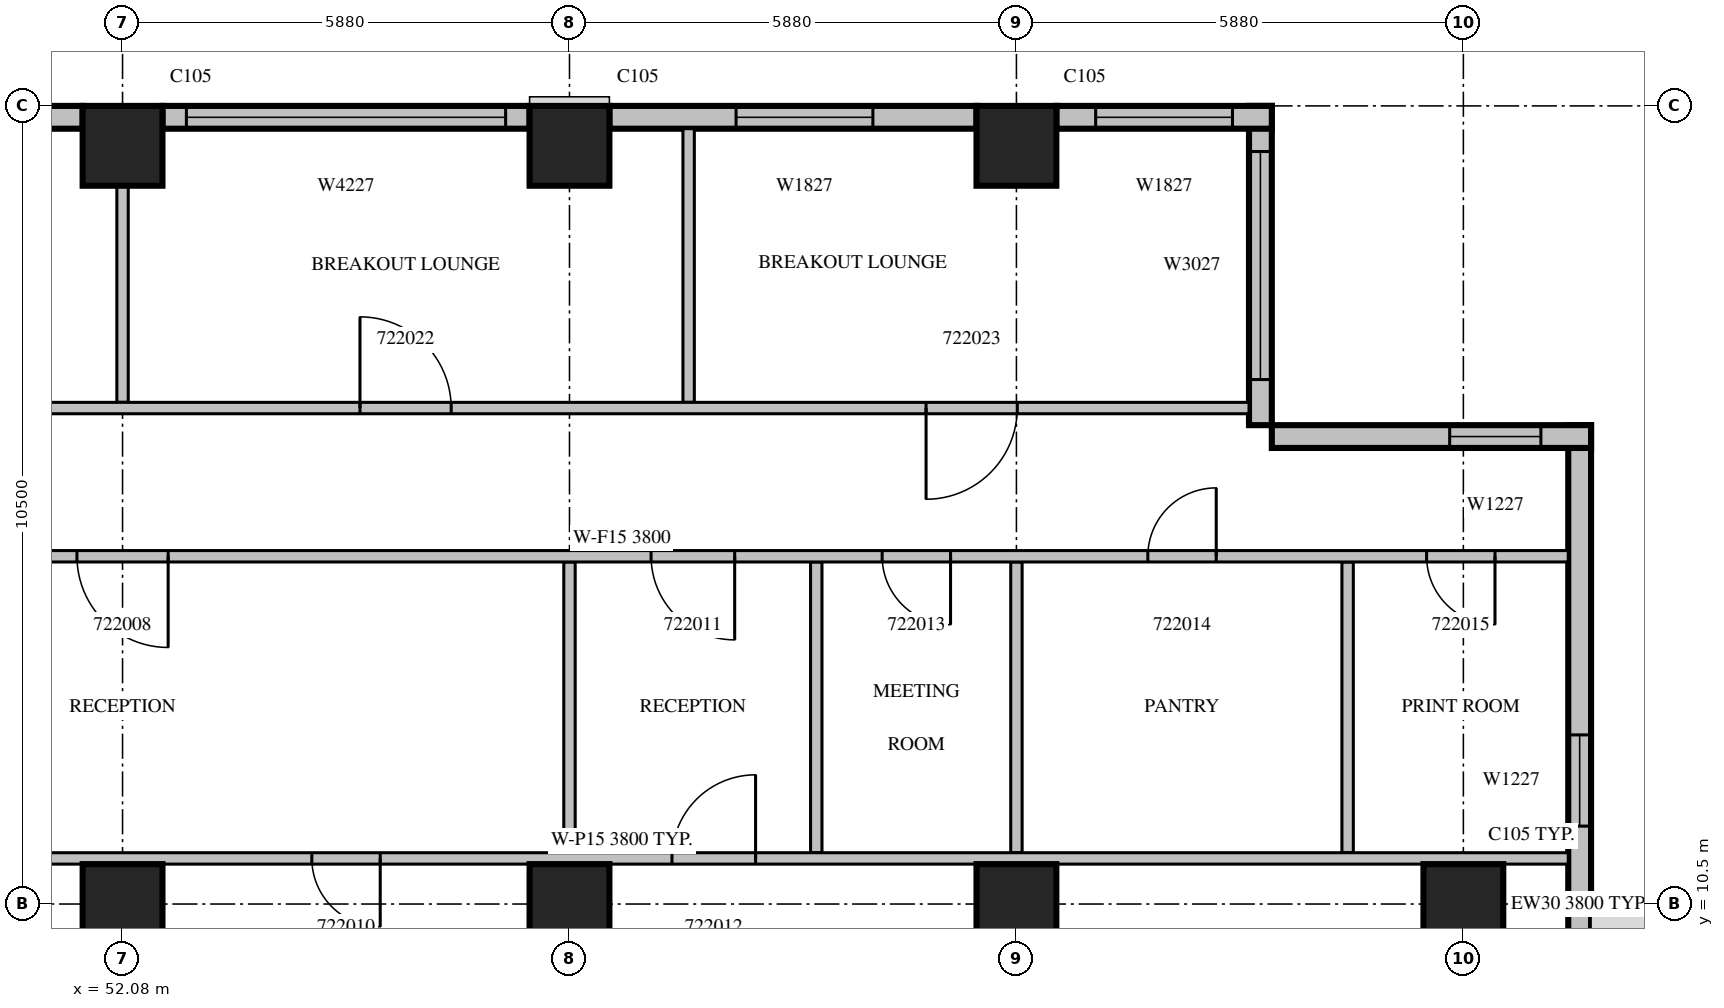
"""IFC4 building model, lengths in metres.
Left out: names, types, materials, properties, quantities, classifications, styles, units other than length and angle.
Written with IfcOpenShell. Run it as: python <this file> out.ifc"""

import sys

from ifc_helpers import new_model, si_unit, direction, frame, frame_2d, origin, origin_2d, place, context, subcontext, project, spatial, rectangle, extrude, source, transform, mapped, element, fill, save


model = new_model("IFC4")
c1 = context("Model", 3, precision=1e-05, world=origin(), true_north=direction((0.0, 1.0)))
c2 = subcontext(c1, "Body", "Model", "MODEL_VIEW")
j1 = project(units=[si_unit("LENGTHUNIT", "METRE"), si_unit("PLANEANGLEUNIT", "RADIAN")], contexts=[c1])
p1 = place(None, origin())
s1 = spatial("IfcSite", under=j1, at=p1, CompositionType="ELEMENT")
p2 = place(p1, origin())
s2 = spatial("IfcBuilding", under=s1, at=p2, CompositionType="ELEMENT")
p3 = place(p2, frame((0.0, 0.0, 103.5)))
s3 = spatial("IfcBuildingStorey", under=s2, at=p3, CompositionType="ELEMENT", Elevation=103.5)
m1 = source(origin(), c2, "Body", "SweptSolid", [
    extrude(rectangle(XDim=1.05, YDim=1.05, at=origin_2d()), origin(), (0.0, 0.0, 1.0), 4.2),
])
for number, where, z_axis, x_axis in (
    (1, (52.08, 10.5, 0.0), (0.0, 0.0, 1.0), (1.0, 0.0, 0.0)),
    (2, (57.96, 10.5, 0.0), (0.0, 0.0, 1.0), (1.0, 0.0, 0.0)),
    (3, (63.84, 10.5, 0.0), (0.0, 0.0, 1.0), (1.0, 0.0, 0.0)),
    (4, (69.72, 10.5, 0.0), (0.0, 0.0, 1.0), (1.0, 0.0, 0.0)),
    (5, (52.08, 20.475, 0.0), (0.0, 0.0, 1.0), (1.0, 0.0, 0.0)),
    (6, (57.96, 20.475, 0.0), (0.0, 0.0, 1.0), (1.0, 0.0, 0.0)),
    (7, (63.84, 20.475, 0.0), (0.0, 0.0, 1.0), (1.0, 0.0, 0.0)),
):
    element("IfcColumn", number, at=place(p3, frame(where, z_axis=z_axis, x_axis=x_axis)), inside=s3, PredefinedType="COLUMN", context=c2, shape_type="MappedRepresentation", body=[
        mapped(m1, transform((0.0, 0.0, 0.0), scale=1.0)),
    ])
m2 = source(origin(), c2, "Body", "SweptSolid", [
    extrude(rectangle(XDim=3.15, YDim=0.3, at=frame_2d((1.575, 0.0))), origin(), (0.0, 0.0, 1.0), 3.8),
])
p4 = place(p3, frame((71.25, 7.35, 0.0), z_axis=(0.0, 0.0, 1.0), x_axis=(0.0, 1.0, 0.0)))
e8 = element("IfcWall", 8, at=p4, inside=s3, PredefinedType="STANDARD", context=c2, shape_type="MappedRepresentation", body=[
    mapped(m2, transform((0.0, 0.0, 0.0), scale=1.0)),
])
m3 = source(origin(), c2, "Body", "SweptSolid", [
    extrude(rectangle(XDim=1.8, YDim=2.4, at=frame_2d((0.9, 1.2))), frame((0.0, 0.16, 0.0), z_axis=(0.0, -1.0, 0.0), x_axis=(1.0, 0.0, 0.0)), (0.0, 0.0, 1.0), 0.32),
])
p5 = place(p4, frame((0.675, 0.0, 0.0)))
e9 = element("IfcOpeningElement", 9, at=p5, cuts=e8, PredefinedType="OPENING", context=c2, shape_type="MappedRepresentation", body=[
    mapped(m3, transform((0.0, 0.0, 0.0), scale=1.0)),
])
m4 = source(origin(), c2, "Body", "SweptSolid", [
    extrude(rectangle(XDim=6.3, YDim=0.3, at=frame_2d((3.15, 0.0))), origin(), (0.0, 0.0, 1.0), 3.8),
])
p6 = place(p3, frame((71.25, 10.5, 0.0), z_axis=(0.0, 0.0, 1.0), x_axis=(0.0, 1.0, 0.0)))
e10 = element("IfcWall", 10, at=p6, inside=s3, PredefinedType="STANDARD", context=c2, shape_type="MappedRepresentation", body=[
    mapped(m4, transform((0.0, 0.0, 0.0), scale=1.0)),
])
m5 = source(origin(), c2, "Body", "SweptSolid", [
    extrude(rectangle(XDim=1.2, YDim=2.7, at=frame_2d((0.6, 1.35))), frame((0.0, 0.16, 0.0), z_axis=(0.0, -1.0, 0.0), x_axis=(1.0, 0.0, 0.0)), (0.0, 0.0, 1.0), 0.32),
])
p7 = place(p6, frame((1.025, 0.0, 0.6)))
e11 = element("IfcOpeningElement", 11, at=p7, cuts=e10, PredefinedType="OPENING", context=c2, shape_type="MappedRepresentation", body=[
    mapped(m5, transform((0.0, 0.0, 0.0), scale=1.0)),
])
m6 = source(origin(), c2, "Body", "SweptSolid", [
    extrude(rectangle(XDim=4.2, YDim=0.3, at=frame_2d((2.1, 0.0))), origin(), (0.0, 0.0, 1.0), 3.8),
])
p8 = place(p3, frame((71.4, 16.65, 0.0), z_axis=(0.0, 0.0, 1.0), x_axis=(-1.0, 0.0, 0.0)))
e12 = element("IfcWall", 12, at=p8, inside=s3, PredefinedType="STANDARD", context=c2, shape_type="MappedRepresentation", body=[
    mapped(m6, transform((0.0, 0.0, 0.0), scale=1.0)),
])
p9 = place(p8, frame((0.66, 0.0, 0.6)))
e13 = element("IfcOpeningElement", 13, at=p9, cuts=e12, PredefinedType="OPENING", context=c2, shape_type="MappedRepresentation", body=[
    mapped(m5, transform((0.0, 0.0, 0.0), scale=1.0)),
])
p10 = place(p3, frame((67.05, 16.8, 0.0), z_axis=(0.0, 0.0, 1.0), x_axis=(0.0, 1.0, 0.0)))
e14 = element("IfcWall", 14, at=p10, inside=s3, PredefinedType="STANDARD", context=c2, shape_type="MappedRepresentation", body=[
    mapped(m6, transform((0.0, 0.0, 0.0), scale=1.0)),
])
m7 = source(origin(), c2, "Body", "SweptSolid", [
    extrude(rectangle(XDim=3.0, YDim=2.7, at=frame_2d((1.5, 1.35))), frame((0.0, 0.16, 0.0), z_axis=(0.0, -1.0, 0.0), x_axis=(1.0, 0.0, 0.0)), (0.0, 0.0, 1.0), 0.32),
])
p11 = place(p10, frame((0.6, 0.0, 0.6)))
e15 = element("IfcOpeningElement", 15, at=p11, cuts=e14, PredefinedType="OPENING", context=c2, shape_type="MappedRepresentation", body=[
    mapped(m7, transform((0.0, 0.0, 0.0), scale=1.0)),
])
m8 = source(origin(), c2, "Body", "SweptSolid", [
    extrude(rectangle(XDim=2.835, YDim=0.3, at=frame_2d((1.417, 0.0))), origin(), (0.0, 0.0, 1.0), 3.8),
])
p12 = place(p3, frame((67.2, 20.85, 0.0), z_axis=(0.0, 0.0, 1.0), x_axis=(-1.0, 0.0, 0.0)))
e16 = element("IfcWall", 16, at=p12, inside=s3, PredefinedType="STANDARD", context=c2, shape_type="MappedRepresentation", body=[
    mapped(m8, transform((0.0, 0.0, 0.0), scale=1.0)),
])
m9 = source(origin(), c2, "Body", "SweptSolid", [
    extrude(rectangle(XDim=1.8, YDim=2.7, at=frame_2d((0.9, 1.35))), frame((0.0, 0.16, 0.0), z_axis=(0.0, -1.0, 0.0), x_axis=(1.0, 0.0, 0.0)), (0.0, 0.0, 1.0), 0.32),
])
p13 = place(p12, frame((0.517, 0.0, 0.6)))
e17 = element("IfcOpeningElement", 17, at=p13, cuts=e16, PredefinedType="OPENING", context=c2, shape_type="MappedRepresentation", body=[
    mapped(m9, transform((0.0, 0.0, 0.0), scale=1.0)),
])
m10 = source(origin(), c2, "Body", "SweptSolid", [
    extrude(rectangle(XDim=4.83, YDim=0.3, at=frame_2d((2.415, 0.0))), origin(), (0.0, 0.0, 1.0), 3.8),
])
p14 = place(p3, frame((63.315, 20.85, 0.0), z_axis=(0.0, 0.0, 1.0), x_axis=(-1.0, 0.0, 0.0)))
e18 = element("IfcWall", 18, at=p14, inside=s3, PredefinedType="STANDARD", context=c2, shape_type="MappedRepresentation", body=[
    mapped(m10, transform((0.0, 0.0, 0.0), scale=1.0)),
])
p15 = place(p14, frame((1.363, 0.0, 0.6)))
e19 = element("IfcOpeningElement", 19, at=p15, cuts=e18, PredefinedType="OPENING", context=c2, shape_type="MappedRepresentation", body=[
    mapped(m9, transform((0.0, 0.0, 0.0), scale=1.0)),
])
p16 = place(p3, frame((57.435, 20.85, 0.0), z_axis=(0.0, 0.0, 1.0), x_axis=(-1.0, 0.0, 0.0)))
e20 = element("IfcWall", 20, at=p16, inside=s3, PredefinedType="STANDARD", context=c2, shape_type="MappedRepresentation", body=[
    mapped(m10, transform((0.0, 0.0, 0.0), scale=1.0)),
])
p17 = place(p16, frame((0.315, 0.0, 0.6)))
e21 = element("IfcOpeningElement", 21, at=p17, cuts=e20, PredefinedType="OPENING", context=c2, shape_type="SweptSolid", body=[
    extrude(rectangle(XDim=4.2, YDim=2.7, at=frame_2d((2.1, 1.35))), frame((0.0, 0.16, 0.0), z_axis=(0.0, -1.0, 0.0), x_axis=(1.0, 0.0, 0.0)), (0.0, 0.0, 1.0), 0.32),
])
p18 = place(p3, frame((51.555, 20.85, 0.0), z_axis=(0.0, 0.0, 1.0), x_axis=(-1.0, 0.0, 0.0)))
e22 = element("IfcWall", 22, at=p18, inside=s3, PredefinedType="STANDARD", context=c2, shape_type="MappedRepresentation", body=[
    mapped(m10, transform((0.0, 0.0, 0.0), scale=1.0)),
])
p19 = place(p18, frame((2.47, 0.0, 0.6)))
e23 = element("IfcOpeningElement", 23, at=p19, cuts=e22, PredefinedType="OPENING", context=c2, shape_type="MappedRepresentation", body=[
    mapped(m5, transform((0.0, 0.0, 0.0), scale=1.0)),
])
p20 = place(p3, frame((61.207, 11.175, 0.0), z_axis=(0.0, 0.0, 1.0), x_axis=(0.0, 1.0, 0.0)))
e24 = element("IfcWall", 24, at=p20, inside=s3, PredefinedType="PARTITIONING", context=c2, shape_type="SweptSolid", body=[
    extrude(rectangle(XDim=3.825, YDim=0.15, at=frame_2d((1.913, 0.0))), origin(), (0.0, 0.0, 1.0), 3.8),
])
m11 = source(origin(), c2, "Body", "SweptSolid", [
    extrude(rectangle(XDim=3.825, YDim=0.15, at=frame_2d((1.913, 0.0))), origin(), (0.0, 0.0, 1.0), 3.8),
])
for number, where, z_axis, x_axis in (
    (25, (63.84, 11.175, 0.0), (0.0, 0.0, 1.0), (0.0, 1.0, 0.0)),
    (26, (68.197, 11.175, 0.0), (0.0, 0.0, 1.0), (0.0, 1.0, 0.0)),
    (27, (57.96, 11.175, 0.0), (0.0, 0.0, 1.0), (0.0, 1.0, 0.0)),
):
    element("IfcWall", number, at=place(p3, frame(where, z_axis=z_axis, x_axis=x_axis)), inside=s3, PredefinedType="PARTITIONING", context=c2, shape_type="MappedRepresentation", body=[
        mapped(m11, transform((0.0, 0.0, 0.0), scale=1.0)),
    ])
m12 = source(origin(), c2, "Body", "SweptSolid", [
    extrude(rectangle(XDim=24.9, YDim=0.15, at=frame_2d((12.45, 0.0))), origin(), (0.0, 0.0, 1.0), 3.8),
])
p21 = place(p3, frame((71.1, 11.1, 0.0), z_axis=(0.0, 0.0, 1.0), x_axis=(-1.0, 0.0, 0.0)))
e28 = element("IfcWall", 28, at=p21, inside=s3, PredefinedType="PARTITIONING", context=c2, shape_type="MappedRepresentation", body=[
    mapped(m12, transform((0.0, 0.0, 0.0), scale=1.0)),
])
m13 = source(origin(), c2, "Body", "SweptSolid", [
    extrude(rectangle(XDim=0.9, YDim=2.1, at=frame_2d((0.45, 1.05))), frame((0.0, 0.085, 0.0), z_axis=(0.0, -1.0, 0.0), x_axis=(1.0, 0.0, 0.0)), (0.0, 0.0, 1.0), 0.17),
])
p22 = place(p21, frame((21.51, 0.0, 0.0)))
e29 = element("IfcOpeningElement", 29, at=p22, cuts=e28, PredefinedType="OPENING", context=c2, shape_type="MappedRepresentation", body=[
    mapped(m13, transform((0.0, 0.0, 0.0), scale=1.0)),
])
p23 = place(p21, frame((15.63, 0.0, 0.0)))
e30 = element("IfcOpeningElement", 30, at=p23, cuts=e28, PredefinedType="OPENING", context=c2, shape_type="MappedRepresentation", body=[
    mapped(m13, transform((0.0, 0.0, 0.0), scale=1.0)),
])
m14 = source(origin(), c2, "Body", "SweptSolid", [
    extrude(rectangle(XDim=1.1, YDim=2.1, at=frame_2d((0.55, 1.05))), frame((0.0, 0.085, 0.0), z_axis=(0.0, -1.0, 0.0), x_axis=(1.0, 0.0, 0.0)), (0.0, 0.0, 1.0), 0.17),
])
p24 = place(p21, frame((10.692, 0.0, 0.0)))
e31 = element("IfcOpeningElement", 31, at=p24, cuts=e28, PredefinedType="OPENING", context=c2, shape_type="MappedRepresentation", body=[
    mapped(m14, transform((0.0, 0.0, 0.0), scale=1.0)),
])
m15 = source(origin(), c2, "Body", "SweptSolid", [
    extrude(rectangle(XDim=3.6, YDim=0.15, at=frame_2d((1.8, 0.0))), origin(), (0.0, 0.0, 1.0), 3.8),
])
p25 = place(p3, frame((59.528, 20.7, 0.0), z_axis=(0.0, 0.0, 1.0), x_axis=(0.0, -1.0, 0.0)))
e32 = element("IfcWall", 32, at=p25, inside=s3, PredefinedType="PARTITIONING", context=c2, shape_type="MappedRepresentation", body=[
    mapped(m15, transform((0.0, 0.0, 0.0), scale=1.0)),
])
m16 = source(origin(), c2, "Body", "SweptSolid", [
    extrude(rectangle(XDim=2.851, YDim=0.15, at=frame_2d((1.425, 0.0))), origin(), (0.0, 0.0, 1.0), 3.8),
])
p26 = place(p3, frame((52.08, 17.1, 0.0), z_axis=(0.0, 0.0, 1.0), x_axis=(0.0, 1.0, 0.0)))
e33 = element("IfcWall", 33, at=p26, inside=s3, PredefinedType="PARTITIONING", context=c2, shape_type="MappedRepresentation", body=[
    mapped(m16, transform((0.0, 0.0, 0.0), scale=1.0)),
])
p27 = place(p3, frame((71.1, 15.075, 0.0), z_axis=(0.0, 0.0, 1.0), x_axis=(-1.0, 0.0, 0.0)))
e34 = element("IfcWall", 34, at=p27, inside=s3, PredefinedType="PARTITIONING", context=c2, shape_type="MappedRepresentation", body=[
    mapped(m12, transform((0.0, 0.0, 0.0), scale=1.0)),
])
m17 = source(origin(), c2, "Body", "SweptSolid", [
    extrude(rectangle(XDim=1.2, YDim=2.1, at=frame_2d((0.6, 1.05))), frame((0.0, 0.085, 0.0), z_axis=(0.0, -1.0, 0.0), x_axis=(1.0, 0.0, 0.0)), (0.0, 0.0, 1.0), 0.17),
])
p28 = place(p27, frame((18.42, 0.0, 0.0)))
e35 = element("IfcOpeningElement", 35, at=p28, cuts=e34, PredefinedType="OPENING", context=c2, shape_type="MappedRepresentation", body=[
    mapped(m17, transform((0.0, 0.0, 0.0), scale=1.0)),
])
p29 = place(p27, frame((10.967, 0.0, 0.0)))
e36 = element("IfcOpeningElement", 36, at=p29, cuts=e34, PredefinedType="OPENING", context=c2, shape_type="MappedRepresentation", body=[
    mapped(m14, transform((0.0, 0.0, 0.0), scale=1.0)),
])
p30 = place(p27, frame((8.127, 0.0, 0.0)))
e37 = element("IfcOpeningElement", 37, at=p30, cuts=e34, PredefinedType="OPENING", context=c2, shape_type="MappedRepresentation", body=[
    mapped(m13, transform((0.0, 0.0, 0.0), scale=1.0)),
])
p31 = place(p27, frame((4.631, 0.0, 0.0)))
e38 = element("IfcOpeningElement", 38, at=p31, cuts=e34, PredefinedType="OPENING", context=c2, shape_type="MappedRepresentation", body=[
    mapped(m13, transform((0.0, 0.0, 0.0), scale=1.0)),
])
p32 = place(p27, frame((0.964, 0.0, 0.0)))
e39 = element("IfcOpeningElement", 39, at=p32, cuts=e34, PredefinedType="OPENING", context=c2, shape_type="MappedRepresentation", body=[
    mapped(m13, transform((0.0, 0.0, 0.0), scale=1.0)),
])
m18 = source(origin(), c2, "Body", "SweptSolid", [
    extrude(rectangle(XDim=37.5, YDim=0.15, at=frame_2d((18.75, 0.0))), origin(), (0.0, 0.0, 1.0), 3.8),
])
p33 = place(p3, frame((29.4, 17.025, 0.0), z_axis=(0.0, 0.0, 1.0), x_axis=(1.0, 0.0, 0.0)))
e40 = element("IfcWall", 40, at=p33, inside=s3, PredefinedType="PARTITIONING", context=c2, shape_type="MappedRepresentation", body=[
    mapped(m18, transform((0.0, 0.0, 0.0), scale=1.0)),
])
m19 = source(origin(), c2, "Body", "SweptSolid", [
    extrude(rectangle(XDim=1.0, YDim=2.1, at=frame_2d((0.5, 1.05))), frame((0.0, 0.085, 0.0), z_axis=(0.0, -1.0, 0.0), x_axis=(1.0, 0.0, 0.0)), (0.0, 0.0, 1.0), 0.17),
])
p34 = place(p33, frame((1.357, 0.0, 0.0)))
e41 = element("IfcOpeningElement", 41, at=p34, cuts=e40, PredefinedType="OPENING", context=c2, shape_type="MappedRepresentation", body=[
    mapped(m19, transform((0.0, 0.0, 0.0), scale=1.0)),
])
p35 = place(p33, frame((4.669, 0.0, 0.0)))
e42 = element("IfcOpeningElement", 42, at=p35, cuts=e40, PredefinedType="OPENING", context=c2, shape_type="MappedRepresentation", body=[
    mapped(m19, transform((0.0, 0.0, 0.0), scale=1.0)),
])
p36 = place(p33, frame((7.012, 0.0, 0.0)))
e43 = element("IfcOpeningElement", 43, at=p36, cuts=e40, PredefinedType="OPENING", context=c2, shape_type="MappedRepresentation", body=[
    mapped(m19, transform((0.0, 0.0, 0.0), scale=1.0)),
])
p37 = place(p33, frame((10.342, 0.0, 0.0)))
e44 = element("IfcOpeningElement", 44, at=p37, cuts=e40, PredefinedType="OPENING", context=c2, shape_type="MappedRepresentation", body=[
    mapped(m13, transform((0.0, 0.0, 0.0), scale=1.0)),
])
p38 = place(p33, frame((15.09, 0.0, 0.0)))
e45 = element("IfcOpeningElement", 45, at=p38, cuts=e40, PredefinedType="OPENING", context=c2, shape_type="MappedRepresentation", body=[
    mapped(m13, transform((0.0, 0.0, 0.0), scale=1.0)),
])
p39 = place(p33, frame((19.837, 0.0, 0.0)))
e46 = element("IfcOpeningElement", 46, at=p39, cuts=e40, PredefinedType="OPENING", context=c2, shape_type="MappedRepresentation", body=[
    mapped(m13, transform((0.0, 0.0, 0.0), scale=1.0)),
])
p40 = place(p33, frame((25.804, 0.0, 0.0)))
e47 = element("IfcOpeningElement", 47, at=p40, cuts=e40, PredefinedType="OPENING", context=c2, shape_type="MappedRepresentation", body=[
    mapped(m17, transform((0.0, 0.0, 0.0), scale=1.0)),
])
p41 = place(p33, frame((33.251, 0.0, 0.0)))
e48 = element("IfcOpeningElement", 48, at=p41, cuts=e40, PredefinedType="OPENING", context=c2, shape_type="MappedRepresentation", body=[
    mapped(m17, transform((0.0, 0.0, 0.0), scale=1.0)),
])
m20 = source(origin(), c2, "Body", "SweptSolid", [
    extrude(rectangle(XDim=1.2, YDim=2.7, at=frame_2d((0.6, 1.35))), frame((0.0, 0.03, 0.0), z_axis=(0.0, -1.0, 0.0), x_axis=(1.0, 0.0, 0.0)), (0.0, 0.0, 1.0), 0.06),
])
p42 = place(p7, origin())
e49 = element("IfcWindow", 49, at=p42, inside=s3, PartitioningType="SINGLE_PANEL", PredefinedType="WINDOW", context=c2, shape_type="MappedRepresentation", body=[
    mapped(m20, transform((0.0, 0.0, 0.0), scale=1.0)),
])
fill(e11, e49)
p43 = place(p9, origin())
e50 = element("IfcWindow", 50, at=p43, inside=s3, PartitioningType="SINGLE_PANEL", PredefinedType="WINDOW", context=c2, shape_type="MappedRepresentation", body=[
    mapped(m20, transform((0.0, 0.0, 0.0), scale=1.0)),
])
fill(e13, e50)
m21 = source(origin(), c2, "Body", "SweptSolid", [
    extrude(rectangle(XDim=3.0, YDim=2.7, at=frame_2d((1.5, 1.35))), frame((0.0, 0.03, 0.0), z_axis=(0.0, -1.0, 0.0), x_axis=(1.0, 0.0, 0.0)), (0.0, 0.0, 1.0), 0.06),
])
p44 = place(p11, origin())
e51 = element("IfcWindow", 51, at=p44, inside=s3, PartitioningType="SINGLE_PANEL", PredefinedType="WINDOW", context=c2, shape_type="MappedRepresentation", body=[
    mapped(m21, transform((0.0, 0.0, 0.0), scale=1.0)),
])
fill(e15, e51)
m22 = source(origin(), c2, "Body", "SweptSolid", [
    extrude(rectangle(XDim=1.8, YDim=2.7, at=frame_2d((0.9, 1.35))), frame((0.0, 0.03, 0.0), z_axis=(0.0, -1.0, 0.0), x_axis=(1.0, 0.0, 0.0)), (0.0, 0.0, 1.0), 0.06),
])
p45 = place(p15, origin())
e52 = element("IfcWindow", 52, at=p45, inside=s3, PartitioningType="SINGLE_PANEL", PredefinedType="WINDOW", context=c2, shape_type="MappedRepresentation", body=[
    mapped(m22, transform((0.0, 0.0, 0.0), scale=1.0)),
])
fill(e19, e52)
p46 = place(p13, origin())
e53 = element("IfcWindow", 53, at=p46, inside=s3, PartitioningType="SINGLE_PANEL", PredefinedType="WINDOW", context=c2, shape_type="MappedRepresentation", body=[
    mapped(m22, transform((0.0, 0.0, 0.0), scale=1.0)),
])
fill(e17, e53)
p47 = place(p17, origin())
e54 = element("IfcWindow", 54, at=p47, inside=s3, PartitioningType="SINGLE_PANEL", PredefinedType="WINDOW", context=c2, shape_type="SweptSolid", body=[
    extrude(rectangle(XDim=4.2, YDim=2.7, at=frame_2d((2.1, 1.35))), frame((0.0, 0.03, 0.0), z_axis=(0.0, -1.0, 0.0), x_axis=(1.0, 0.0, 0.0)), (0.0, 0.0, 1.0), 0.06),
])
fill(e21, e54)
m23 = source(origin(), c2, "Body", "SweptSolid", [
    extrude(rectangle(XDim=1.2, YDim=2.1, at=frame_2d((0.6, 1.05))), frame((0.0, 0.025, 0.0), z_axis=(0.0, -1.0, 0.0), x_axis=(1.0, 0.0, 0.0)), (0.0, 0.0, 1.0), 0.05),
])
p48 = place(p28, origin())
e55 = element("IfcDoor", 55, at=p48, inside=s3, OperationType="SINGLE_SWING_LEFT", PredefinedType="DOOR", context=c2, shape_type="MappedRepresentation", body=[
    mapped(m23, transform((0.0, 0.0, 0.0), scale=1.0)),
])
fill(e35, e55)
m24 = source(origin(), c2, "Body", "SweptSolid", [
    extrude(rectangle(XDim=0.9, YDim=2.1, at=frame_2d((0.45, 1.05))), frame((0.0, 0.025, 0.0), z_axis=(0.0, -1.0, 0.0), x_axis=(1.0, 0.0, 0.0)), (0.0, 0.0, 1.0), 0.05),
])
p49 = place(p23, origin())
e56 = element("IfcDoor", 56, at=p49, inside=s3, OperationType="SINGLE_SWING_LEFT", PredefinedType="DOOR", context=c2, shape_type="MappedRepresentation", body=[
    mapped(m24, transform((0.0, 0.0, 0.0), scale=1.0)),
])
fill(e30, e56)
m25 = source(origin(), c2, "Body", "SweptSolid", [
    extrude(rectangle(XDim=1.1, YDim=2.1, at=frame_2d((0.55, 1.05))), frame((0.0, 0.025, 0.0), z_axis=(0.0, -1.0, 0.0), x_axis=(1.0, 0.0, 0.0)), (0.0, 0.0, 1.0), 0.05),
])
p50 = place(p29, origin())
e57 = element("IfcDoor", 57, at=p50, inside=s3, OperationType="SINGLE_SWING_LEFT", PredefinedType="DOOR", context=c2, shape_type="MappedRepresentation", body=[
    mapped(m25, transform((0.0, 0.0, 0.0), scale=1.0)),
])
fill(e36, e57)
p51 = place(p24, origin())
e58 = element("IfcDoor", 58, at=p51, inside=s3, OperationType="SINGLE_SWING_RIGHT", PredefinedType="DOOR", context=c2, shape_type="MappedRepresentation", body=[
    mapped(m25, transform((0.0, 0.0, 0.0), scale=1.0)),
])
fill(e31, e58)
p52 = place(p30, origin())
e59 = element("IfcDoor", 59, at=p52, inside=s3, OperationType="SINGLE_SWING_LEFT", PredefinedType="DOOR", context=c2, shape_type="MappedRepresentation", body=[
    mapped(m24, transform((0.0, 0.0, 0.0), scale=1.0)),
])
fill(e37, e59)
p53 = place(p31, origin())
e60 = element("IfcDoor", 60, at=p53, inside=s3, OperationType="SINGLE_SWING_RIGHT", PredefinedType="DOOR", context=c2, shape_type="MappedRepresentation", body=[
    mapped(m24, transform((0.0, 0.0, 0.0), scale=1.0)),
])
fill(e38, e60)
p54 = place(p32, origin())
e61 = element("IfcDoor", 61, at=p54, inside=s3, OperationType="SINGLE_SWING_LEFT", PredefinedType="DOOR", context=c2, shape_type="MappedRepresentation", body=[
    mapped(m24, transform((0.0, 0.0, 0.0), scale=1.0)),
])
fill(e39, e61)
p55 = place(p40, origin())
e62 = element("IfcDoor", 62, at=p55, inside=s3, OperationType="SINGLE_SWING_LEFT", PredefinedType="DOOR", context=c2, shape_type="MappedRepresentation", body=[
    mapped(m23, transform((0.0, 0.0, 0.0), scale=1.0)),
])
fill(e47, e62)
p56 = place(p41, origin())
e63 = element("IfcDoor", 63, at=p56, inside=s3, OperationType="SINGLE_SWING_RIGHT", PredefinedType="DOOR", context=c2, shape_type="MappedRepresentation", body=[
    mapped(m23, transform((0.0, 0.0, 0.0), scale=1.0)),
])
fill(e48, e63)
save(model, sys.argv[1])
